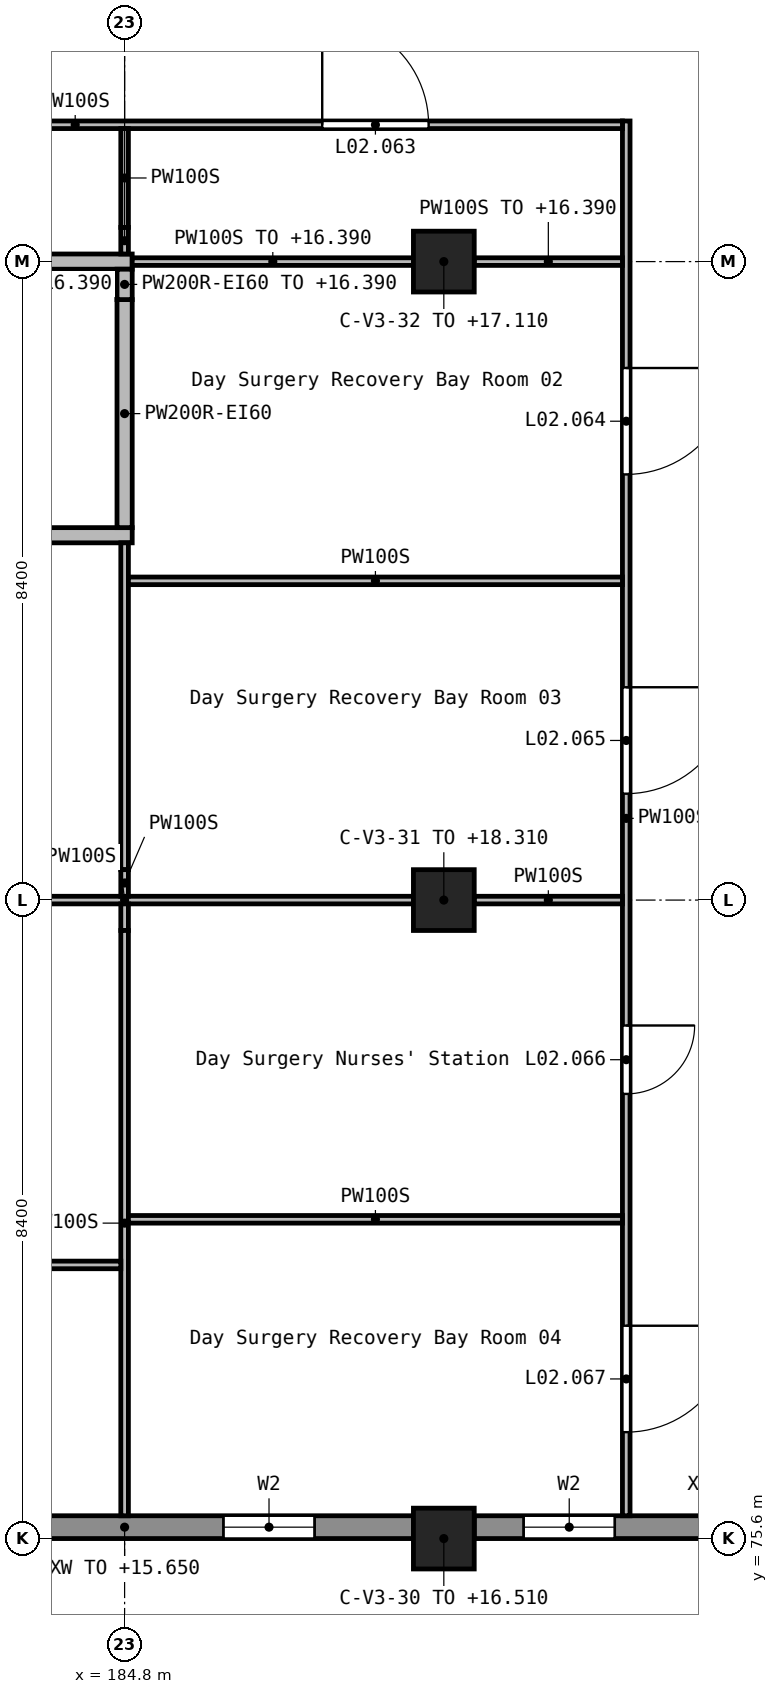
"""IFC4 building model, lengths in metres.
Left out: names, types, materials, properties, quantities, classifications, styles, units other than length and angle.
Written with IfcOpenShell. Run it as: python <this file> out.ifc"""

import sys

from ifc_helpers import new_model, si_unit, direction, frame, frame_2d, origin, origin_2d, place, context, subcontext, project, spatial, rectangle, extrude, element, fill, save


model = new_model("IFC4")
c1 = context("Model", 3, precision=1e-05, world=origin(), true_north=direction((0.0, 1.0)))
c2 = subcontext(c1, "Body", "Model", "MODEL_VIEW")
j1 = project(units=[si_unit("LENGTHUNIT", "METRE"), si_unit("PLANEANGLEUNIT", "RADIAN")], contexts=[c1])
p1 = place(None, origin())
s1 = spatial("IfcSite", under=j1, at=p1, CompositionType="ELEMENT")
p2 = place(p1, origin())
s2 = spatial("IfcBuilding", under=s1, at=p2, CompositionType="ELEMENT")
p3 = place(p2, frame((0.0, 0.0, 12.6)))
s3 = spatial("IfcBuildingStorey", under=s2, at=p3, CompositionType="ELEMENT", Elevation=12.6)
p4 = place(p3, frame((189.0, 75.6, 0.0), z_axis=(0.0, 0.0, 1.0), x_axis=(1.0, 0.0, 0.0)))
e1 = element("IfcColumn", 1, at=p4, inside=s3, PredefinedType="COLUMN", context=c2, shape_type="SweptSolid", body=[
    extrude(rectangle(XDim=0.8, YDim=0.8, at=origin_2d()), origin(), (0.0, 0.0, 1.0), 3.91),
])
p5 = place(p3, frame((189.0, 84.0, 0.0), z_axis=(0.0, 0.0, 1.0), x_axis=(1.0, 0.0, 0.0)))
e2 = element("IfcColumn", 2, at=p5, inside=s3, PredefinedType="COLUMN", context=c2, shape_type="SweptSolid", body=[
    extrude(rectangle(XDim=0.8, YDim=0.8, at=origin_2d()), origin(), (0.0, 0.0, 1.0), 5.71),
])
p6 = place(p3, frame((189.0, 92.4, 0.0), z_axis=(0.0, 0.0, 1.0), x_axis=(1.0, 0.0, 0.0)))
e3 = element("IfcColumn", 3, at=p6, inside=s3, PredefinedType="COLUMN", context=c2, shape_type="SweptSolid", body=[
    extrude(rectangle(XDim=0.8, YDim=0.8, at=origin_2d()), origin(), (0.0, 0.0, 1.0), 4.51),
])
p7 = place(p3, frame((181.0, 75.75, 0.0), z_axis=(0.0, 0.0, 1.0), x_axis=(1.0, 0.0, 0.0)))
e4 = element("IfcWall", 4, at=p7, inside=s3, PredefinedType="STANDARD", context=c2, shape_type="SweptSolid", body=[
    extrude(rectangle(XDim=7.6, YDim=0.3, at=frame_2d((3.8, 0.0))), origin(), (0.0, 0.0, 1.0), 3.05),
])
p8 = place(p7, frame((1.3, 0.0, 1.2)))
e5 = element("IfcOpeningElement", 5, at=p8, cuts=e4, PredefinedType="OPENING", context=c2, shape_type="SweptSolid", body=[
    extrude(rectangle(XDim=1.2, YDim=1.2, at=frame_2d((0.6, 0.6))), frame((0.0, 0.16, 0.0), z_axis=(0.0, -1.0, 0.0), x_axis=(1.0, 0.0, 0.0)), (0.0, 0.0, 1.0), 0.32),
])
p9 = place(p7, frame((5.1, 0.0, 1.2)))
e6 = element("IfcOpeningElement", 6, at=p9, cuts=e4, PredefinedType="OPENING", context=c2, shape_type="SweptSolid", body=[
    extrude(rectangle(XDim=1.2, YDim=1.2, at=frame_2d((0.6, 0.6))), frame((0.0, 0.16, 0.0), z_axis=(0.0, -1.0, 0.0), x_axis=(1.0, 0.0, 0.0)), (0.0, 0.0, 1.0), 0.32),
])
p10 = place(p3, frame((189.4, 75.75, 0.0), z_axis=(0.0, 0.0, 1.0), x_axis=(1.0, 0.0, 0.0)))
e7 = element("IfcWall", 7, at=p10, inside=s3, PredefinedType="STANDARD", context=c2, shape_type="SweptSolid", body=[
    extrude(rectangle(XDim=7.6, YDim=0.3, at=frame_2d((3.8, 0.0))), origin(), (0.0, 0.0, 1.0), 3.05),
])
p11 = place(p10, frame((0.65, 0.0, 1.2)))
e8 = element("IfcOpeningElement", 8, at=p11, cuts=e7, PredefinedType="OPENING", context=c2, shape_type="SweptSolid", body=[
    extrude(rectangle(XDim=1.2, YDim=1.2, at=frame_2d((0.6, 0.6))), frame((0.0, 0.16, 0.0), z_axis=(0.0, -1.0, 0.0), x_axis=(1.0, 0.0, 0.0)), (0.0, 0.0, 1.0), 0.32),
])
p12 = place(p10, frame((5.1, 0.0, 1.2)))
e9 = element("IfcOpeningElement", 9, at=p12, cuts=e7, PredefinedType="OPENING", context=c2, shape_type="SweptSolid", body=[
    extrude(rectangle(XDim=1.2, YDim=1.2, at=frame_2d((0.6, 0.6))), frame((0.0, 0.16, 0.0), z_axis=(0.0, -1.0, 0.0), x_axis=(1.0, 0.0, 0.0)), (0.0, 0.0, 1.0), 0.32),
])
p13 = place(p3, frame((176.9, 88.8, 0.0), z_axis=(0.0, 0.0, 1.0), x_axis=(1.0, 0.0, 0.0)))
e10 = element("IfcWall", 10, at=p13, inside=s3, PredefinedType="SOLIDWALL", context=c2, shape_type="SweptSolid", body=[
    extrude(rectangle(XDim=8.0, YDim=0.2, at=frame_2d((4.0, 0.0))), origin(), (0.0, 0.0, 1.0), 3.85),
])
p14 = place(p3, frame((181.0, 92.4, 0.0), z_axis=(0.0, 0.0, 1.0), x_axis=(1.0, 0.0, 0.0)))
e11 = element("IfcWall", 11, at=p14, inside=s3, PredefinedType="SOLIDWALL", context=c2, shape_type="SweptSolid", body=[
    extrude(rectangle(XDim=3.9, YDim=0.2, at=frame_2d((1.95, 0.0))), origin(), (0.0, 0.0, 1.0), 3.79),
])
p15 = place(p3, frame((184.8, 88.9, 0.0), z_axis=(0.0, 0.0, 1.0), x_axis=(0.0, 1.0, 0.0)))
e12 = element("IfcWall", 12, at=p15, inside=s3, PredefinedType="SOLIDWALL", context=c2, shape_type="SweptSolid", body=[
    extrude(rectangle(XDim=3.0, YDim=0.2, at=frame_2d((1.5, 0.0))), origin(), (0.0, 0.0, 1.0), 3.85),
])
p16 = place(p3, frame((184.8, 91.9, 0.0), z_axis=(0.0, 0.0, 1.0), x_axis=(0.0, 1.0, 0.0)))
e13 = element("IfcWall", 13, at=p16, inside=s3, PredefinedType="SOLIDWALL", context=c2, shape_type="SweptSolid", body=[
    extrude(rectangle(XDim=0.4, YDim=0.2, at=frame_2d((0.2, 0.0))), origin(), (0.0, 0.0, 1.0), 3.79),
])
p17 = place(p3, frame((191.4, 94.25, 0.0), z_axis=(0.0, 0.0, 1.0), x_axis=(0.0, -1.0, 0.0)))
e14 = element("IfcWall", 14, at=p17, inside=s3, PredefinedType="PARTITIONING", context=c2, shape_type="SweptSolid", body=[
    extrude(rectangle(XDim=18.35, YDim=0.1, at=frame_2d((9.175, 0.0))), origin(), (0.0, 0.0, 1.0), 3.79),
])
p18 = place(p17, frame((3.25, 0.0, 0.0)))
e15 = element("IfcOpeningElement", 15, at=p18, cuts=e14, PredefinedType="OPENING", context=c2, shape_type="SweptSolid", body=[
    extrude(rectangle(XDim=1.4, YDim=2.1, at=frame_2d((0.7, 1.05))), frame((0.0, 0.06, 0.0), z_axis=(0.0, -1.0, 0.0), x_axis=(1.0, 0.0, 0.0)), (0.0, 0.0, 1.0), 0.12),
])
p19 = place(p17, frame((7.45, 0.0, 0.0)))
e16 = element("IfcOpeningElement", 16, at=p19, cuts=e14, PredefinedType="OPENING", context=c2, shape_type="SweptSolid", body=[
    extrude(rectangle(XDim=1.4, YDim=2.1, at=frame_2d((0.7, 1.05))), frame((0.0, 0.06, 0.0), z_axis=(0.0, -1.0, 0.0), x_axis=(1.0, 0.0, 0.0)), (0.0, 0.0, 1.0), 0.12),
])
p20 = place(p17, frame((11.9, 0.0, 0.0)))
e17 = element("IfcOpeningElement", 17, at=p20, cuts=e14, PredefinedType="OPENING", context=c2, shape_type="SweptSolid", body=[
    extrude(rectangle(XDim=0.9, YDim=2.1, at=frame_2d((0.45, 1.05))), frame((0.0, 0.06, 0.0), z_axis=(0.0, -1.0, 0.0), x_axis=(1.0, 0.0, 0.0)), (0.0, 0.0, 1.0), 0.12),
])
p21 = place(p17, frame((15.85, 0.0, 0.0)))
e18 = element("IfcOpeningElement", 18, at=p21, cuts=e14, PredefinedType="OPENING", context=c2, shape_type="SweptSolid", body=[
    extrude(rectangle(XDim=1.4, YDim=2.1, at=frame_2d((0.7, 1.05))), frame((0.0, 0.06, 0.0), z_axis=(0.0, -1.0, 0.0), x_axis=(1.0, 0.0, 0.0)), (0.0, 0.0, 1.0), 0.12),
])
p22 = place(p3, frame((181.0, 84.0, 0.0), z_axis=(0.0, 0.0, 1.0), x_axis=(1.0, 0.0, 0.0)))
e19 = element("IfcWall", 19, at=p22, inside=s3, PredefinedType="PARTITIONING", context=c2, shape_type="SweptSolid", body=[
    extrude(rectangle(XDim=7.6, YDim=0.1, at=frame_2d((3.8, 0.0))), origin(), (0.0, 0.0, 1.0), 3.85),
])
p23 = place(p3, frame((189.4, 84.0, 0.0), z_axis=(0.0, 0.0, 1.0), x_axis=(1.0, 0.0, 0.0)))
e20 = element("IfcWall", 20, at=p23, inside=s3, PredefinedType="PARTITIONING", context=c2, shape_type="SweptSolid", body=[
    extrude(rectangle(XDim=1.95, YDim=0.1, at=frame_2d((0.975, 0.0))), origin(), (0.0, 0.0, 1.0), 3.85),
])
p24 = place(p3, frame((176.95, 94.2, 0.0), z_axis=(0.0, 0.0, 1.0), x_axis=(1.0, 0.0, 0.0)))
e21 = element("IfcWall", 21, at=p24, inside=s3, PredefinedType="PARTITIONING", context=c2, shape_type="SweptSolid", body=[
    extrude(rectangle(XDim=14.4, YDim=0.1, at=frame_2d((7.2, 0.0))), origin(), (0.0, 0.0, 1.0), 3.85),
])
p25 = place(p24, frame((3.25, 0.0, 0.0)))
e22 = element("IfcOpeningElement", 22, at=p25, cuts=e21, PredefinedType="OPENING", context=c2, shape_type="SweptSolid", body=[
    extrude(rectangle(XDim=1.4, YDim=2.1, at=frame_2d((0.7, 1.05))), frame((0.0, 0.06, 0.0), z_axis=(0.0, -1.0, 0.0), x_axis=(1.0, 0.0, 0.0)), (0.0, 0.0, 1.0), 0.12),
])
p26 = place(p24, frame((10.45, 0.0, 0.0)))
e23 = element("IfcOpeningElement", 23, at=p26, cuts=e21, PredefinedType="OPENING", context=c2, shape_type="SweptSolid", body=[
    extrude(rectangle(XDim=1.4, YDim=2.1, at=frame_2d((0.7, 1.05))), frame((0.0, 0.06, 0.0), z_axis=(0.0, -1.0, 0.0), x_axis=(1.0, 0.0, 0.0)), (0.0, 0.0, 1.0), 0.12),
])
p27 = place(p3, frame((184.8, 88.7, 0.0), z_axis=(0.0, 0.0, 1.0), x_axis=(0.0, -1.0, 0.0)))
e24 = element("IfcWall", 24, at=p27, inside=s3, PredefinedType="PARTITIONING", context=c2, shape_type="SweptSolid", body=[
    extrude(rectangle(XDim=4.3, YDim=0.1, at=frame_2d((2.15, 0.0))), origin(), (0.0, 0.0, 1.0), 3.85),
])
for number, where, z_axis, x_axis in (
    (25, (184.8, 84.4, 0.0), (0.0, 0.0, 1.0), (0.0, -1.0, 0.0)),
    (26, (184.8, 83.95, 0.0), (0.0, 0.0, 1.0), (0.0, -1.0, 0.0)),
):
    element("IfcWall", number, at=place(p3, frame(where, z_axis=z_axis, x_axis=x_axis)), inside=s3, PredefinedType="PARTITIONING", context=c2, shape_type="SweptSolid", body=[
        extrude(rectangle(XDim=0.35, YDim=0.1, at=frame_2d((0.175, 0.0))), origin(), (0.0, 0.0, 1.0), 3.85),
    ])
p28 = place(p3, frame((184.8, 83.6, 0.0), z_axis=(0.0, 0.0, 1.0), x_axis=(0.0, -1.0, 0.0)))
e27 = element("IfcWall", 27, at=p28, inside=s3, PredefinedType="PARTITIONING", context=c2, shape_type="SweptSolid", body=[
    extrude(rectangle(XDim=7.7, YDim=0.1, at=frame_2d((3.85, 0.0))), origin(), (0.0, 0.0, 1.0), 3.85),
])
p29 = place(p3, frame((177.05, 79.2, 0.0), z_axis=(0.0, 0.0, 1.0), x_axis=(1.0, 0.0, 0.0)))
e28 = element("IfcWall", 28, at=p29, inside=s3, PredefinedType="PARTITIONING", context=c2, shape_type="SweptSolid", body=[
    extrude(rectangle(XDim=7.7, YDim=0.1, at=frame_2d((3.85, 0.0))), origin(), (0.0, 0.0, 1.0), 3.85),
])
for number, where, z_axis, x_axis in (
    (29, (184.85, 79.8, 0.0), (0.0, 0.0, 1.0), (1.0, 0.0, 0.0)),
    (30, (184.85, 88.2, 0.0), (0.0, 0.0, 1.0), (1.0, 0.0, 0.0)),
):
    element("IfcWall", number, at=place(p3, frame(where, z_axis=z_axis, x_axis=x_axis)), inside=s3, PredefinedType="PARTITIONING", context=c2, shape_type="SweptSolid", body=[
        extrude(rectangle(XDim=6.5, YDim=0.1, at=frame_2d((3.25, 0.0))), origin(), (0.0, 0.0, 1.0), 3.85),
    ])
p30 = place(p3, frame((184.9, 92.4, 0.0), z_axis=(0.0, 0.0, 1.0), x_axis=(1.0, 0.0, 0.0)))
e31 = element("IfcWall", 31, at=p30, inside=s3, PredefinedType="PARTITIONING", context=c2, shape_type="SweptSolid", body=[
    extrude(rectangle(XDim=3.7, YDim=0.1, at=frame_2d((1.85, 0.0))), origin(), (0.0, 0.0, 1.0), 3.79),
])
p31 = place(p3, frame((189.4, 92.4, 0.0), z_axis=(0.0, 0.0, 1.0), x_axis=(1.0, 0.0, 0.0)))
e32 = element("IfcWall", 32, at=p31, inside=s3, PredefinedType="PARTITIONING", context=c2, shape_type="SweptSolid", body=[
    extrude(rectangle(XDim=1.95, YDim=0.1, at=frame_2d((0.975, 0.0))), origin(), (0.0, 0.0, 1.0), 3.79),
])
p32 = place(p3, frame((184.8, 92.5, 0.0), z_axis=(0.0, 0.0, 1.0), x_axis=(0.0, 1.0, 0.0)))
e33 = element("IfcWall", 33, at=p32, inside=s3, PredefinedType="PARTITIONING", context=c2, shape_type="SweptSolid", body=[
    extrude(rectangle(XDim=0.35, YDim=0.1, at=frame_2d((0.175, 0.0))), origin(), (0.0, 0.0, 1.0), 3.79),
])
p33 = place(p3, frame((184.8, 92.85, 0.0), z_axis=(0.0, 0.0, 1.0), x_axis=(0.0, 1.0, 0.0)))
e34 = element("IfcWall", 34, at=p33, inside=s3, PredefinedType="PARTITIONING", context=c2, shape_type="SweptSolid", body=[
    extrude(rectangle(XDim=1.3, YDim=0.1, at=frame_2d((0.65, 0.0))), origin(), (0.0, 0.0, 1.0), 3.85),
])
p34 = place(p9, origin())
e35 = element("IfcWindow", 35, at=p34, inside=s3, PartitioningType="SINGLE_PANEL", PredefinedType="WINDOW", context=c2, shape_type="SweptSolid", body=[
    extrude(rectangle(XDim=1.2, YDim=1.2, at=frame_2d((0.6, 0.6))), frame((0.0, 0.03, 0.0), z_axis=(0.0, -1.0, 0.0), x_axis=(1.0, 0.0, 0.0)), (0.0, 0.0, 1.0), 0.06),
])
fill(e6, e35)
p35 = place(p11, origin())
e36 = element("IfcWindow", 36, at=p35, inside=s3, PartitioningType="SINGLE_PANEL", PredefinedType="WINDOW", context=c2, shape_type="SweptSolid", body=[
    extrude(rectangle(XDim=1.2, YDim=1.2, at=frame_2d((0.6, 0.6))), frame((0.0, 0.03, 0.0), z_axis=(0.0, -1.0, 0.0), x_axis=(1.0, 0.0, 0.0)), (0.0, 0.0, 1.0), 0.06),
])
fill(e8, e36)
p36 = place(p26, frame((1.4, 0.0, 0.0), z_axis=(0.0, 0.0, 1.0), x_axis=(-1.0, 0.0, 0.0)))
e37 = element("IfcDoor", 37, at=p36, inside=s3, OperationType="DOUBLE_DOOR_SINGLE_SWING", PredefinedType="DOOR", context=c2, shape_type="SweptSolid", body=[
    extrude(rectangle(XDim=1.4, YDim=2.1, at=frame_2d((0.7, 1.05))), frame((0.0, 0.025, 0.0), z_axis=(0.0, -1.0, 0.0), x_axis=(1.0, 0.0, 0.0)), (0.0, 0.0, 1.0), 0.05),
])
fill(e23, e37)
p37 = place(p18, frame((1.4, 0.0, 0.0), z_axis=(0.0, 0.0, 1.0), x_axis=(-1.0, 0.0, 0.0)))
e38 = element("IfcDoor", 38, at=p37, inside=s3, OperationType="DOUBLE_DOOR_SINGLE_SWING", PredefinedType="DOOR", context=c2, shape_type="SweptSolid", body=[
    extrude(rectangle(XDim=1.4, YDim=2.1, at=frame_2d((0.7, 1.05))), frame((0.0, 0.025, 0.0), z_axis=(0.0, -1.0, 0.0), x_axis=(1.0, 0.0, 0.0)), (0.0, 0.0, 1.0), 0.05),
])
fill(e15, e38)
p38 = place(p19, frame((1.4, 0.0, 0.0), z_axis=(0.0, 0.0, 1.0), x_axis=(-1.0, 0.0, 0.0)))
e39 = element("IfcDoor", 39, at=p38, inside=s3, OperationType="DOUBLE_DOOR_SINGLE_SWING", PredefinedType="DOOR", context=c2, shape_type="SweptSolid", body=[
    extrude(rectangle(XDim=1.4, YDim=2.1, at=frame_2d((0.7, 1.05))), frame((0.0, 0.025, 0.0), z_axis=(0.0, -1.0, 0.0), x_axis=(1.0, 0.0, 0.0)), (0.0, 0.0, 1.0), 0.05),
])
fill(e16, e39)
p39 = place(p20, frame((0.9, 0.0, 0.0), z_axis=(0.0, 0.0, 1.0), x_axis=(-1.0, 0.0, 0.0)))
e40 = element("IfcDoor", 40, at=p39, inside=s3, OperationType="SINGLE_SWING_LEFT", PredefinedType="DOOR", context=c2, shape_type="SweptSolid", body=[
    extrude(rectangle(XDim=0.9, YDim=2.1, at=frame_2d((0.45, 1.05))), frame((0.0, 0.025, 0.0), z_axis=(0.0, -1.0, 0.0), x_axis=(1.0, 0.0, 0.0)), (0.0, 0.0, 1.0), 0.05),
])
fill(e17, e40)
p40 = place(p21, frame((1.4, 0.0, 0.0), z_axis=(0.0, 0.0, 1.0), x_axis=(-1.0, 0.0, 0.0)))
e41 = element("IfcDoor", 41, at=p40, inside=s3, OperationType="DOUBLE_DOOR_SINGLE_SWING", PredefinedType="DOOR", context=c2, shape_type="SweptSolid", body=[
    extrude(rectangle(XDim=1.4, YDim=2.1, at=frame_2d((0.7, 1.05))), frame((0.0, 0.025, 0.0), z_axis=(0.0, -1.0, 0.0), x_axis=(1.0, 0.0, 0.0)), (0.0, 0.0, 1.0), 0.05),
])
fill(e18, e41)
save(model, sys.argv[1])
